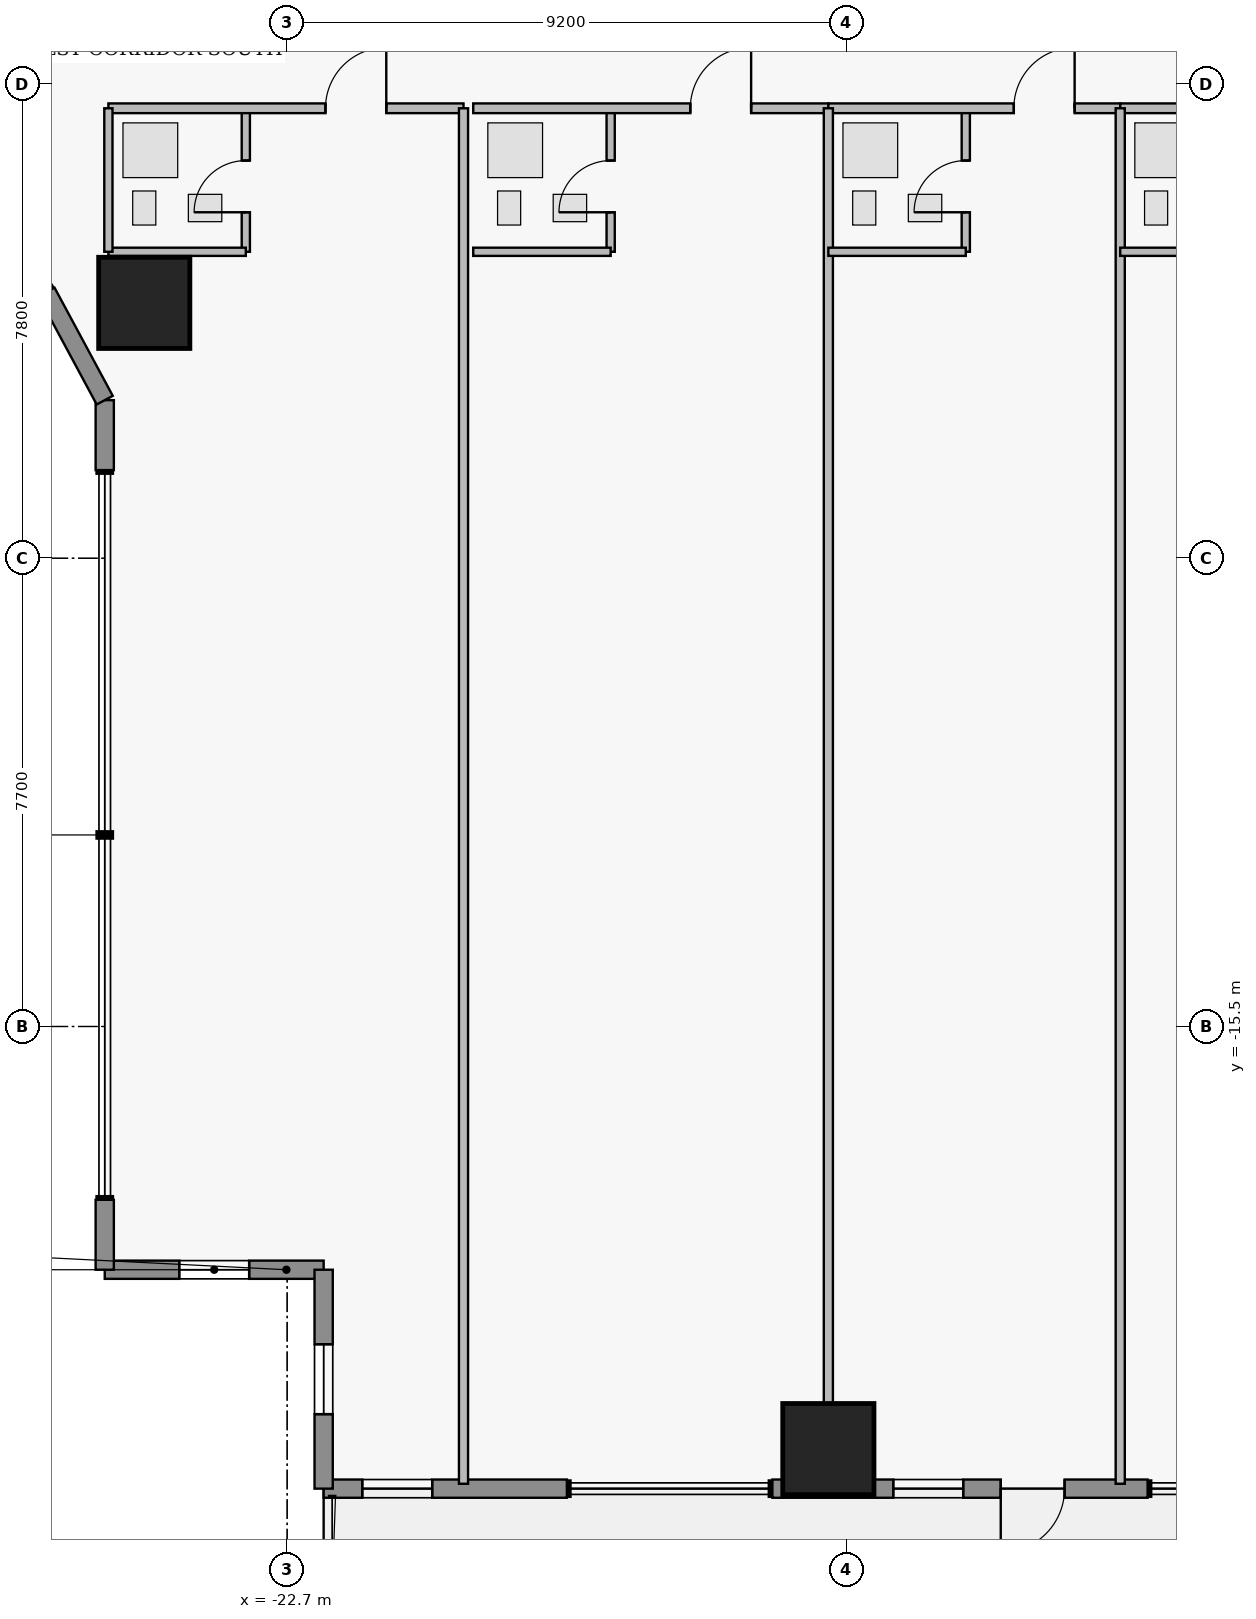
"""IFC4 building model, lengths in metres.
Left out: names, types, materials, properties, quantities, classifications, styles, units other than length and angle.
Written with IfcOpenShell. Run it as: python <this file> out.ifc"""

import sys

from ifc_helpers import new_model, si_unit, direction, frame, frame_2d, origin, origin_2d, place, context, subcontext, project, spatial, rectangle, extrude, element, fill, save


model = new_model("IFC4")
c1 = context("Model", 3, precision=1e-05, world=origin(), true_north=direction((0.0, 1.0)))
c2 = subcontext(c1, "Body", "Model", "MODEL_VIEW")
j1 = project(units=[si_unit("LENGTHUNIT", "METRE"), si_unit("PLANEANGLEUNIT", "RADIAN")], contexts=[c1])
p1 = place(None, origin())
s1 = spatial("IfcSite", under=j1, at=p1, CompositionType="ELEMENT")
p2 = place(p1, origin())
s2 = spatial("IfcBuilding", under=s1, at=p2, CompositionType="ELEMENT")
p3 = place(p2, frame((0.0, 0.0, 60.45)))
s3 = spatial("IfcBuildingStorey", under=s2, at=p3, CompositionType="ELEMENT", Elevation=60.45)
for number, where, z_axis, x_axis in (
    (1, (-13.8, -22.45, 0.0), (0.0, 0.0, 1.0), (1.0, 0.0, 0.0)),
    (2, (-25.05, -3.6, 0.0), (0.0, 0.0, 1.0), (1.0, 0.0, 0.0)),
):
    element("IfcColumn", number, at=place(p3, frame(where, z_axis=z_axis, x_axis=x_axis)), inside=s3, PredefinedType="COLUMN", context=c2, shape_type="SweptSolid", body=[
        extrude(rectangle(XDim=1.5, YDim=1.5, at=origin_2d()), origin(), (0.0, 0.0, 1.0), 3.65),
    ])
p4 = place(p3, frame((-22.1, -19.5, 0.0), z_axis=(0.0, 0.0, 1.0), x_axis=(-1.0, 0.0, 0.0)))
e3 = element("IfcWall", 3, at=p4, inside=s3, PredefinedType="STANDARD", context=c2, shape_type="SweptSolid", body=[
    extrude(rectangle(XDim=3.6, YDim=0.3, at=frame_2d((1.8, 0.0))), origin(), (0.0, 0.0, 1.0), 3.43),
])
p5 = place(p4, frame((1.225, 0.0, 1.25)))
e4 = element("IfcOpeningElement", 4, at=p5, cuts=e3, PredefinedType="OPENING", context=c2, shape_type="SweptSolid", body=[
    extrude(rectangle(XDim=1.15, YDim=1.55, at=frame_2d((0.575, 0.775))), frame((0.0, 0.16, 0.0), z_axis=(0.0, -1.0, 0.0), x_axis=(1.0, 0.0, 0.0)), (0.0, 0.0, 1.0), 0.32),
])
p6 = place(p3, frame((-25.7, -19.5, 0.0), z_axis=(0.0, 0.0, 1.0), x_axis=(0.0, 1.0, 0.0)))
e5 = element("IfcWall", 5, at=p6, inside=s3, PredefinedType="STANDARD", context=c2, shape_type="SweptSolid", body=[
    extrude(rectangle(XDim=1.15, YDim=0.3, at=frame_2d((0.575, 0.0))), origin(), (0.0, 0.0, 1.0), 3.43),
])
p7 = place(p3, frame((-25.7, -6.35, 0.0), z_axis=(0.0, 0.0, 1.0), x_axis=(0.0, 1.0, 0.0)))
e6 = element("IfcWall", 6, at=p7, inside=s3, PredefinedType="STANDARD", context=c2, shape_type="SweptSolid", body=[
    extrude(rectangle(XDim=1.15, YDim=0.3, at=frame_2d((0.575, 0.0))), origin(), (0.0, 0.0, 1.0), 3.43),
])
p8 = place(p3, frame((-25.7, -5.2, 0.0), z_axis=(0.0, 0.0, 1.0), x_axis=(-0.474121438562, 0.88045946045, 0.0)))
e7 = element("IfcWall", 7, at=p8, inside=s3, PredefinedType="STANDARD", context=c2, shape_type="SweptSolid", body=[
    extrude(rectangle(XDim=2.021, YDim=0.3, at=frame_2d((1.01, 0.0))), origin(), (0.0, 0.0, 1.0), 3.43),
])
p9 = place(p3, frame((-28.5, 0.0, 0.0), z_axis=(0.0, 0.0, 1.0), x_axis=(0.474109683532, 0.880465790352, 0.0)))
e8 = element("IfcWall", 8, at=p9, inside=s3, PredefinedType="STANDARD", context=c2, shape_type="SweptSolid", body=[
    extrude(rectangle(XDim=5.906, YDim=0.3, at=frame_2d((2.953, 0.0))), origin(), (0.0, 0.0, 1.0), 3.43),
])
p10 = place(p9, frame((2.432, 0.0, 0.95)))
e9 = element("IfcOpeningElement", 9, at=p10, cuts=e8, PredefinedType="OPENING", context=c2, shape_type="SweptSolid", body=[
    extrude(rectangle(XDim=1.15, YDim=1.55, at=frame_2d((0.575, 0.775))), frame((0.0, 0.16, 0.0), z_axis=(0.0, -1.0, 0.0), x_axis=(1.0, 0.0, 0.0)), (0.0, 0.0, 1.0), 0.32),
])
p11 = place(p3, frame((-8.55, -23.1, 0.0), z_axis=(0.0, 0.0, 1.0), x_axis=(-1.0, 0.0, 0.0)))
e10 = element("IfcWall", 10, at=p11, inside=s3, PredefinedType="STANDARD", context=c2, shape_type="SweptSolid", body=[
    extrude(rectangle(XDim=6.17, YDim=0.3, at=frame_2d((3.085, 0.0))), origin(), (0.0, 0.0, 1.0), 3.43),
])
p12 = place(p11, frame((1.365, 0.0, 0.0)))
e11 = element("IfcOpeningElement", 11, at=p12, cuts=e10, PredefinedType="OPENING", context=c2, shape_type="SweptSolid", body=[
    extrude(rectangle(XDim=1.05, YDim=2.2, at=frame_2d((0.525, 1.1))), frame((0.0, 0.16, 0.0), z_axis=(0.0, -1.0, 0.0), x_axis=(1.0, 0.0, 0.0)), (0.0, 0.0, 1.0), 0.32),
])
p13 = place(p11, frame((3.032, 0.0, 0.95)))
e12 = element("IfcOpeningElement", 12, at=p13, cuts=e10, PredefinedType="OPENING", context=c2, shape_type="SweptSolid", body=[
    extrude(rectangle(XDim=1.15, YDim=1.55, at=frame_2d((0.575, 0.775))), frame((0.0, 0.16, 0.0), z_axis=(0.0, -1.0, 0.0), x_axis=(1.0, 0.0, 0.0)), (0.0, 0.0, 1.0), 0.32),
])
p14 = place(p3, frame((-18.1, -23.1, 0.0), z_axis=(0.0, 0.0, 1.0), x_axis=(-1.0, 0.0, 0.0)))
e13 = element("IfcWall", 13, at=p14, inside=s3, PredefinedType="STANDARD", context=c2, shape_type="SweptSolid", body=[
    extrude(rectangle(XDim=4.0, YDim=0.3, at=frame_2d((2.0, 0.0))), origin(), (0.0, 0.0, 1.0), 3.43),
])
p15 = place(p14, frame((2.215, 0.0, 0.95)))
e14 = element("IfcOpeningElement", 14, at=p15, cuts=e13, PredefinedType="OPENING", context=c2, shape_type="SweptSolid", body=[
    extrude(rectangle(XDim=1.15, YDim=1.55, at=frame_2d((0.575, 0.775))), frame((0.0, 0.16, 0.0), z_axis=(0.0, -1.0, 0.0), x_axis=(1.0, 0.0, 0.0)), (0.0, 0.0, 1.0), 0.32),
])
p16 = place(p3, frame((-22.1, -23.1, 0.0), z_axis=(0.0, 0.0, 1.0), x_axis=(0.0, 1.0, 0.0)))
e15 = element("IfcWall", 15, at=p16, inside=s3, PredefinedType="STANDARD", context=c2, shape_type="SweptSolid", body=[
    extrude(rectangle(XDim=3.6, YDim=0.3, at=frame_2d((1.8, 0.0))), origin(), (0.0, 0.0, 1.0), 3.43),
])
p17 = place(p16, frame((1.225, 0.0, 1.25)))
e16 = element("IfcOpeningElement", 16, at=p17, cuts=e15, PredefinedType="OPENING", context=c2, shape_type="SweptSolid", body=[
    extrude(rectangle(XDim=1.15, YDim=1.55, at=frame_2d((0.575, 0.775))), frame((0.0, 0.16, 0.0), z_axis=(0.0, -1.0, 0.0), x_axis=(1.0, 0.0, 0.0)), (0.0, 0.0, 1.0), 0.32),
])
p18 = place(p3, frame((-23.38, -2.76, 0.0), z_axis=(0.0, 0.0, 1.0), x_axis=(0.0, 1.0, 0.0)))
e17 = element("IfcWall", 17, at=p18, inside=s3, PredefinedType="PLUMBINGWALL", context=c2, shape_type="SweptSolid", body=[
    extrude(rectangle(XDim=2.36, YDim=0.135, at=frame_2d((1.18, 0.0))), origin(), (0.0, 0.0, 1.0), 3.43),
])
p19 = place(p18, frame((0.65, 0.0, 0.0)))
e18 = element("IfcOpeningElement", 18, at=p19, cuts=e17, PredefinedType="OPENING", context=c2, shape_type="SweptSolid", body=[
    extrude(rectangle(XDim=0.85, YDim=2.1, at=frame_2d((0.425, 1.05))), frame((0.0, 0.077, 0.0), z_axis=(0.0, -1.0, 0.0), x_axis=(1.0, 0.0, 0.0)), (0.0, 0.0, 1.0), 0.155),
])
p20 = place(p3, frame((-25.64, -0.4, 0.0), z_axis=(0.0, 0.0, 1.0), x_axis=(1.0, 0.0, 0.0)))
e19 = element("IfcWall", 19, at=p20, inside=s3, PredefinedType="PARTITIONING", context=c2, shape_type="SweptSolid", body=[
    extrude(rectangle(XDim=5.84, YDim=0.16, at=frame_2d((2.92, 0.0))), origin(), (0.0, 0.0, 1.0), 3.43),
])
p21 = place(p20, frame((3.57, 0.0, 0.0)))
e20 = element("IfcOpeningElement", 20, at=p21, cuts=e19, PredefinedType="OPENING", context=c2, shape_type="SweptSolid", body=[
    extrude(rectangle(XDim=1.0, YDim=2.15, at=frame_2d((0.5, 1.075))), frame((0.0, 0.09, 0.0), z_axis=(0.0, -1.0, 0.0), x_axis=(1.0, 0.0, 0.0)), (0.0, 0.0, 1.0), 0.18),
])
p22 = place(p3, frame((-17.38, -2.76, 0.0), z_axis=(0.0, 0.0, 1.0), x_axis=(0.0, 1.0, 0.0)))
e21 = element("IfcWall", 21, at=p22, inside=s3, PredefinedType="PLUMBINGWALL", context=c2, shape_type="SweptSolid", body=[
    extrude(rectangle(XDim=2.36, YDim=0.135, at=frame_2d((1.18, 0.0))), origin(), (0.0, 0.0, 1.0), 3.43),
])
p23 = place(p22, frame((0.65, 0.0, 0.0)))
e22 = element("IfcOpeningElement", 22, at=p23, cuts=e21, PredefinedType="OPENING", context=c2, shape_type="SweptSolid", body=[
    extrude(rectangle(XDim=0.85, YDim=2.1, at=frame_2d((0.425, 1.05))), frame((0.0, 0.077, 0.0), z_axis=(0.0, -1.0, 0.0), x_axis=(1.0, 0.0, 0.0)), (0.0, 0.0, 1.0), 0.155),
])
p24 = place(p3, frame((-19.64, -0.4, 0.0), z_axis=(0.0, 0.0, 1.0), x_axis=(1.0, 0.0, 0.0)))
e23 = element("IfcWall", 23, at=p24, inside=s3, PredefinedType="PARTITIONING", context=c2, shape_type="SweptSolid", body=[
    extrude(rectangle(XDim=5.84, YDim=0.16, at=frame_2d((2.92, 0.0))), origin(), (0.0, 0.0, 1.0), 3.43),
])
p25 = place(p24, frame((3.57, 0.0, 0.0)))
e24 = element("IfcOpeningElement", 24, at=p25, cuts=e23, PredefinedType="OPENING", context=c2, shape_type="SweptSolid", body=[
    extrude(rectangle(XDim=1.0, YDim=2.15, at=frame_2d((0.5, 1.075))), frame((0.0, 0.09, 0.0), z_axis=(0.0, -1.0, 0.0), x_axis=(1.0, 0.0, 0.0)), (0.0, 0.0, 1.0), 0.18),
])
p26 = place(p3, frame((-11.54, -2.76, 0.0), z_axis=(0.0, 0.0, 1.0), x_axis=(0.0, 1.0, 0.0)))
e25 = element("IfcWall", 25, at=p26, inside=s3, PredefinedType="PLUMBINGWALL", context=c2, shape_type="SweptSolid", body=[
    extrude(rectangle(XDim=2.36, YDim=0.135, at=frame_2d((1.18, 0.0))), origin(), (0.0, 0.0, 1.0), 3.43),
])
p27 = place(p26, frame((0.65, 0.0, 0.0)))
e26 = element("IfcOpeningElement", 26, at=p27, cuts=e25, PredefinedType="OPENING", context=c2, shape_type="SweptSolid", body=[
    extrude(rectangle(XDim=0.85, YDim=2.1, at=frame_2d((0.425, 1.05))), frame((0.0, 0.077, 0.0), z_axis=(0.0, -1.0, 0.0), x_axis=(1.0, 0.0, 0.0)), (0.0, 0.0, 1.0), 0.155),
])
p28 = place(p3, frame((-13.8, -0.4, 0.0), z_axis=(0.0, 0.0, 1.0), x_axis=(1.0, 0.0, 0.0)))
e27 = element("IfcWall", 27, at=p28, inside=s3, PredefinedType="PARTITIONING", context=c2, shape_type="SweptSolid", body=[
    extrude(rectangle(XDim=4.8, YDim=0.16, at=frame_2d((2.4, 0.0))), origin(), (0.0, 0.0, 1.0), 3.43),
])
p29 = place(p28, frame((3.05, 0.0, 0.0)))
e28 = element("IfcOpeningElement", 28, at=p29, cuts=e27, PredefinedType="OPENING", context=c2, shape_type="SweptSolid", body=[
    extrude(rectangle(XDim=1.0, YDim=2.15, at=frame_2d((0.5, 1.075))), frame((0.0, 0.09, 0.0), z_axis=(0.0, -1.0, 0.0), x_axis=(1.0, 0.0, 0.0)), (0.0, 0.0, 1.0), 0.18),
])
p30 = place(p3, frame((-9.0, -0.4, 0.0), z_axis=(0.0, 0.0, 1.0), x_axis=(1.0, 0.0, 0.0)))
e29 = element("IfcWall", 29, at=p30, inside=s3, PredefinedType="PARTITIONING", context=c2, shape_type="SweptSolid", body=[
    extrude(rectangle(XDim=4.4, YDim=0.16, at=frame_2d((2.2, 0.0))), origin(), (0.0, 0.0, 1.0), 3.43),
])
p31 = place(p30, frame((2.85, 0.0, 0.0)))
e30 = element("IfcOpeningElement", 30, at=p31, cuts=e29, PredefinedType="OPENING", context=c2, shape_type="SweptSolid", body=[
    extrude(rectangle(XDim=1.0, YDim=2.15, at=frame_2d((0.5, 1.075))), frame((0.0, 0.09, 0.0), z_axis=(0.0, -1.0, 0.0), x_axis=(1.0, 0.0, 0.0)), (0.0, 0.0, 1.0), 0.18),
])
p32 = place(p3, frame((-25.64, -2.76, 0.0), z_axis=(0.0, 0.0, 1.0), x_axis=(1.0, 0.0, 0.0)))
e31 = element("IfcWall", 31, at=p32, inside=s3, PredefinedType="PLUMBINGWALL", context=c2, shape_type="SweptSolid", body=[
    extrude(rectangle(XDim=2.26, YDim=0.135, at=frame_2d((1.13, 0.0))), origin(), (0.0, 0.0, 1.0), 3.43),
])
p33 = place(p3, frame((-25.64, -2.76, 0.0), z_axis=(0.0, 0.0, 1.0), x_axis=(0.0, 1.0, 0.0)))
e32 = element("IfcWall", 32, at=p33, inside=s3, PredefinedType="PLUMBINGWALL", context=c2, shape_type="SweptSolid", body=[
    extrude(rectangle(XDim=2.36, YDim=0.135, at=frame_2d((1.18, 0.0))), origin(), (0.0, 0.0, 1.0), 3.43),
])
p34 = place(p3, frame((-19.8, -23.02, 0.0), z_axis=(0.0, 0.0, 1.0), x_axis=(0.0, 1.0, 0.0)))
e33 = element("IfcWall", 33, at=p34, inside=s3, PredefinedType="PARTITIONING", context=c2, shape_type="SweptSolid", body=[
    extrude(rectangle(XDim=22.62, YDim=0.15, at=frame_2d((11.31, 0.0))), origin(), (0.0, 0.0, 1.0), 3.43),
])
p35 = place(p3, frame((-19.64, -2.76, 0.0), z_axis=(0.0, 0.0, 1.0), x_axis=(1.0, 0.0, 0.0)))
e34 = element("IfcWall", 34, at=p35, inside=s3, PredefinedType="PLUMBINGWALL", context=c2, shape_type="SweptSolid", body=[
    extrude(rectangle(XDim=2.26, YDim=0.135, at=frame_2d((1.13, 0.0))), origin(), (0.0, 0.0, 1.0), 3.43),
])
p36 = place(p3, frame((-13.8, -23.02, 0.0), z_axis=(0.0, 0.0, 1.0), x_axis=(0.0, 1.0, 0.0)))
e35 = element("IfcWall", 35, at=p36, inside=s3, PredefinedType="PARTITIONING", context=c2, shape_type="SweptSolid", body=[
    extrude(rectangle(XDim=22.62, YDim=0.15, at=frame_2d((11.31, 0.0))), origin(), (0.0, 0.0, 1.0), 2.668),
])
p37 = place(p3, frame((-13.8, -2.76, 0.0), z_axis=(0.0, 0.0, 1.0), x_axis=(1.0, 0.0, 0.0)))
e36 = element("IfcWall", 36, at=p37, inside=s3, PredefinedType="PLUMBINGWALL", context=c2, shape_type="SweptSolid", body=[
    extrude(rectangle(XDim=2.26, YDim=0.135, at=frame_2d((1.13, 0.0))), origin(), (0.0, 0.0, 1.0), 3.43),
])
p38 = place(p3, frame((-9.0, -23.02, 0.0), z_axis=(0.0, 0.0, 1.0), x_axis=(0.0, 1.0, 0.0)))
e37 = element("IfcWall", 37, at=p38, inside=s3, PredefinedType="PARTITIONING", context=c2, shape_type="SweptSolid", body=[
    extrude(rectangle(XDim=22.62, YDim=0.15, at=frame_2d((11.31, 0.0))), origin(), (0.0, 0.0, 1.0), 3.43),
])
p39 = place(p3, frame((-9.0, -2.76, 0.0), z_axis=(0.0, 0.0, 1.0), x_axis=(1.0, 0.0, 0.0)))
e38 = element("IfcWall", 38, at=p39, inside=s3, PredefinedType="PLUMBINGWALL", context=c2, shape_type="SweptSolid", body=[
    extrude(rectangle(XDim=2.26, YDim=0.135, at=frame_2d((1.13, 0.0))), origin(), (0.0, 0.0, 1.0), 3.43),
])
p40 = place(p5, origin())
e39 = element("IfcWindow", 39, at=p40, inside=s3, PartitioningType="SINGLE_PANEL", PredefinedType="WINDOW", context=c2, shape_type="SweptSolid", body=[
    extrude(rectangle(XDim=1.15, YDim=1.55, at=frame_2d((0.575, 0.775))), frame((0.0, 0.03, 0.0), z_axis=(0.0, -1.0, 0.0), x_axis=(1.0, 0.0, 0.0)), (0.0, 0.0, 1.0), 0.06),
])
fill(e4, e39)
p41 = place(p12, origin())
e40 = element("IfcDoor", 40, at=p41, inside=s3, OperationType="SINGLE_SWING_RIGHT", PredefinedType="DOOR", context=c2, shape_type="SweptSolid", body=[
    extrude(rectangle(XDim=1.05, YDim=2.2, at=frame_2d((0.525, 1.1))), frame((0.0, 0.025, 0.0), z_axis=(0.0, -1.0, 0.0), x_axis=(1.0, 0.0, 0.0)), (0.0, 0.0, 1.0), 0.05),
])
fill(e11, e40)
p42 = place(p13, origin())
e41 = element("IfcWindow", 41, at=p42, inside=s3, PartitioningType="SINGLE_PANEL", PredefinedType="WINDOW", context=c2, shape_type="SweptSolid", body=[
    extrude(rectangle(XDim=1.15, YDim=1.55, at=frame_2d((0.575, 0.775))), frame((0.0, 0.03, 0.0), z_axis=(0.0, -1.0, 0.0), x_axis=(1.0, 0.0, 0.0)), (0.0, 0.0, 1.0), 0.06),
])
fill(e12, e41)
p43 = place(p15, origin())
e42 = element("IfcWindow", 42, at=p43, inside=s3, PartitioningType="SINGLE_PANEL", PredefinedType="WINDOW", context=c2, shape_type="SweptSolid", body=[
    extrude(rectangle(XDim=1.15, YDim=1.55, at=frame_2d((0.575, 0.775))), frame((0.0, 0.03, 0.0), z_axis=(0.0, -1.0, 0.0), x_axis=(1.0, 0.0, 0.0)), (0.0, 0.0, 1.0), 0.06),
])
fill(e14, e42)
p44 = place(p17, origin())
e43 = element("IfcWindow", 43, at=p44, inside=s3, PartitioningType="SINGLE_PANEL", PredefinedType="WINDOW", context=c2, shape_type="SweptSolid", body=[
    extrude(rectangle(XDim=1.15, YDim=1.55, at=frame_2d((0.575, 0.775))), frame((0.0, 0.03, 0.0), z_axis=(0.0, -1.0, 0.0), x_axis=(1.0, 0.0, 0.0)), (0.0, 0.0, 1.0), 0.06),
])
fill(e16, e43)
p45 = place(p19, origin())
e44 = element("IfcDoor", 44, at=p45, inside=s3, OperationType="SINGLE_SWING_LEFT", PredefinedType="DOOR", context=c2, shape_type="SweptSolid", body=[
    extrude(rectangle(XDim=0.85, YDim=2.1, at=frame_2d((0.425, 1.05))), frame((0.0, 0.025, 0.0), z_axis=(0.0, -1.0, 0.0), x_axis=(1.0, 0.0, 0.0)), (0.0, 0.0, 1.0), 0.05),
])
fill(e18, e44)
p46 = place(p21, origin())
e45 = element("IfcDoor", 45, at=p46, inside=s3, OperationType="SINGLE_SWING_RIGHT", PredefinedType="DOOR", context=c2, shape_type="SweptSolid", body=[
    extrude(rectangle(XDim=1.0, YDim=2.15, at=frame_2d((0.5, 1.075))), frame((0.0, 0.025, 0.0), z_axis=(0.0, -1.0, 0.0), x_axis=(1.0, 0.0, 0.0)), (0.0, 0.0, 1.0), 0.05),
])
fill(e20, e45)
p47 = place(p23, origin())
e46 = element("IfcDoor", 46, at=p47, inside=s3, OperationType="SINGLE_SWING_LEFT", PredefinedType="DOOR", context=c2, shape_type="SweptSolid", body=[
    extrude(rectangle(XDim=0.85, YDim=2.1, at=frame_2d((0.425, 1.05))), frame((0.0, 0.025, 0.0), z_axis=(0.0, -1.0, 0.0), x_axis=(1.0, 0.0, 0.0)), (0.0, 0.0, 1.0), 0.05),
])
fill(e22, e46)
p48 = place(p25, origin())
e47 = element("IfcDoor", 47, at=p48, inside=s3, OperationType="SINGLE_SWING_RIGHT", PredefinedType="DOOR", context=c2, shape_type="SweptSolid", body=[
    extrude(rectangle(XDim=1.0, YDim=2.15, at=frame_2d((0.5, 1.075))), frame((0.0, 0.025, 0.0), z_axis=(0.0, -1.0, 0.0), x_axis=(1.0, 0.0, 0.0)), (0.0, 0.0, 1.0), 0.05),
])
fill(e24, e47)
p49 = place(p27, origin())
e48 = element("IfcDoor", 48, at=p49, inside=s3, OperationType="SINGLE_SWING_LEFT", PredefinedType="DOOR", context=c2, shape_type="SweptSolid", body=[
    extrude(rectangle(XDim=0.85, YDim=2.1, at=frame_2d((0.425, 1.05))), frame((0.0, 0.025, 0.0), z_axis=(0.0, -1.0, 0.0), x_axis=(1.0, 0.0, 0.0)), (0.0, 0.0, 1.0), 0.05),
])
fill(e26, e48)
p50 = place(p29, origin())
e49 = element("IfcDoor", 49, at=p50, inside=s3, OperationType="SINGLE_SWING_RIGHT", PredefinedType="DOOR", context=c2, shape_type="SweptSolid", body=[
    extrude(rectangle(XDim=1.0, YDim=2.15, at=frame_2d((0.5, 1.075))), frame((0.0, 0.025, 0.0), z_axis=(0.0, -1.0, 0.0), x_axis=(1.0, 0.0, 0.0)), (0.0, 0.0, 1.0), 0.05),
])
fill(e28, e49)
save(model, sys.argv[1])
